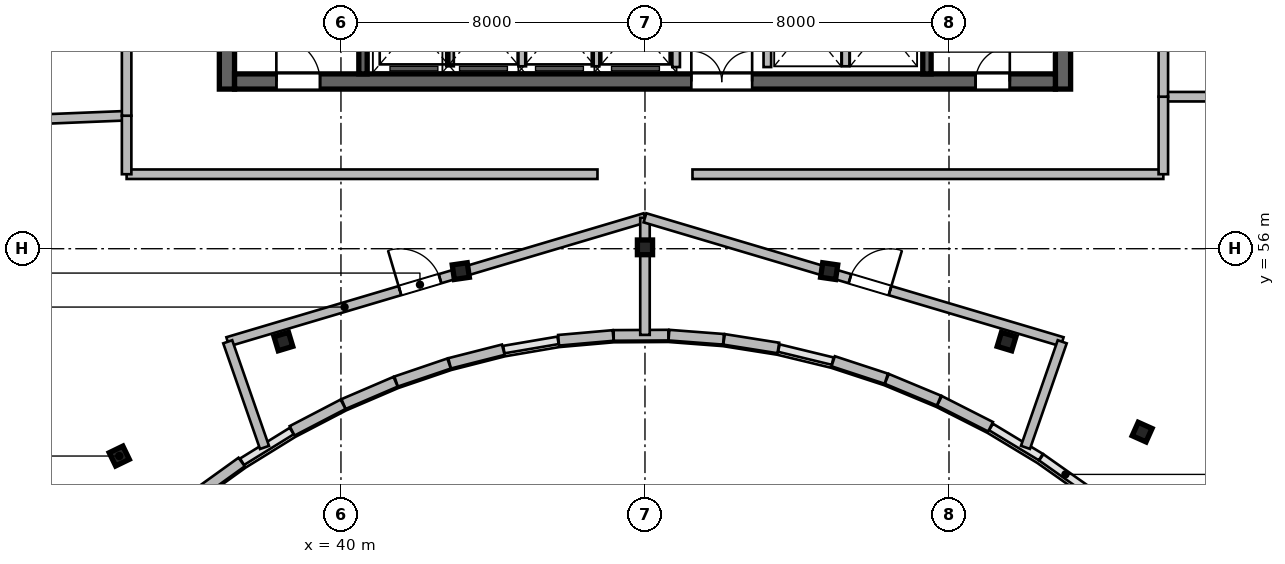
"""IFC4 building model, lengths in metres.
Left out: names, types, materials, properties, quantities, classifications, styles, units other than length and angle.
Written with IfcOpenShell. Run it as: python <this file> out.ifc"""

import sys

from ifc_helpers import new_model, si_unit, direction, frame, frame_2d, origin, origin_2d, place, context, subcontext, project, spatial, rectangle, i_section, extrude, source, transform, mapped, element, fill, save


model = new_model("IFC4")
c1 = context("Model", 3, precision=1e-05, world=origin(), true_north=direction((0.0, 1.0)))
c2 = subcontext(c1, "Body", "Model", "MODEL_VIEW")
j1 = project(units=[si_unit("LENGTHUNIT", "METRE"), si_unit("PLANEANGLEUNIT", "RADIAN")], contexts=[c1])
p1 = place(None, origin())
s1 = spatial("IfcSite", under=j1, at=p1, CompositionType="ELEMENT")
p2 = place(p1, origin())
s2 = spatial("IfcBuilding", under=s1, at=p2, CompositionType="ELEMENT")
p3 = place(p2, frame((0.0, 0.0, 299.1)))
s3 = spatial("IfcBuildingStorey", under=s2, at=p3, CompositionType="ELEMENT", Elevation=299.1)
m1 = source(origin(), c2, "Body", "SweptSolid", [
    extrude(rectangle(XDim=12.0, YDim=0.4, at=frame_2d((6.0, 0.0))), origin(), (0.0, 0.0, 1.0), 3.9),
])
for number, where, z_axis, x_axis in (
    (1, (37.0, 60.2, 0.0), (0.0, 0.0, 1.0), (0.0, 1.0, 0.0)),
    (2, (59.0, 60.2, 0.0), (0.0, 0.0, 1.0), (0.0, 1.0, 0.0)),
):
    element("IfcWall", number, at=place(p3, frame(where, z_axis=z_axis, x_axis=x_axis)), inside=s3, PredefinedType="SHEAR", context=c2, shape_type="MappedRepresentation", body=[
        mapped(m1, transform((0.0, 0.0, 0.0), scale=1.0)),
    ])
m2 = source(origin(), c2, "Body", "SweptSolid", [
    extrude(rectangle(XDim=21.6, YDim=0.4, at=frame_2d((10.8, 0.0))), origin(), (0.0, 0.0, 1.0), 3.9),
])
p4 = place(p3, frame((37.2, 60.4, 0.0), z_axis=(0.0, 0.0, 1.0), x_axis=(1.0, 0.0, 0.0)))
e3 = element("IfcWall", 3, at=p4, inside=s3, PredefinedType="SHEAR", context=c2, shape_type="MappedRepresentation", body=[
    mapped(m2, transform((0.0, 0.0, 0.0), scale=1.0)),
])
p5 = place(p4, frame((1.1, 0.0, 0.0)))
e4 = element("IfcOpeningElement", 4, at=p5, cuts=e3, PredefinedType="OPENING", context=c2, shape_type="SweptSolid", body=[
    extrude(rectangle(XDim=1.15, YDim=2.15, at=frame_2d((0.575, 1.075))), frame((0.0, 0.21, 0.0), z_axis=(0.0, -1.0, 0.0), x_axis=(1.0, 0.0, 0.0)), (0.0, 0.0, 1.0), 0.42),
])
p6 = place(p4, frame((19.5, 0.0, 0.0)))
e5 = element("IfcOpeningElement", 5, at=p6, cuts=e3, PredefinedType="OPENING", context=c2, shape_type="SweptSolid", body=[
    extrude(rectangle(XDim=0.9, YDim=2.1, at=frame_2d((0.45, 1.05))), frame((0.0, 0.21, 0.0), z_axis=(0.0, -1.0, 0.0), x_axis=(1.0, 0.0, 0.0)), (0.0, 0.0, 1.0), 0.42),
])
p7 = place(p4, frame((12.02, 0.0, 0.0)))
e6 = element("IfcOpeningElement", 6, at=p7, cuts=e3, PredefinedType="OPENING", context=c2, shape_type="SweptSolid", body=[
    extrude(rectangle(XDim=1.6, YDim=2.15, at=frame_2d((0.8, 1.075))), frame((0.0, 0.21, 0.0), z_axis=(0.0, -1.0, 0.0), x_axis=(1.0, 0.0, 0.0)), (0.0, 0.0, 1.0), 0.42),
])
m3 = source(origin(), c2, "Body", "SweptSolid", [
    extrude(rectangle(XDim=11.2, YDim=0.22, at=frame_2d((5.6, 0.0))), origin(), (0.0, 0.0, 1.0), 3.9),
])
p8 = place(p3, frame((40.58, 60.6, 0.0), z_axis=(0.0, 0.0, 1.0), x_axis=(0.0, 1.0, 0.0)))
e7 = element("IfcWall", 7, at=p8, inside=s3, PredefinedType="SHEAR", context=c2, shape_type="MappedRepresentation", body=[
    mapped(m3, transform((0.0, 0.0, 0.0), scale=1.0)),
])
p9 = place(p3, frame((55.42, 60.6, 0.0), z_axis=(0.0, 0.0, 1.0), x_axis=(0.0, 1.0, 0.0)))
e8 = element("IfcWall", 8, at=p9, inside=s3, PredefinedType="SHEAR", context=c2, shape_type="MappedRepresentation", body=[
    mapped(m3, transform((0.0, 0.0, 0.0), scale=1.0)),
])
p10 = place(p9, frame((9.645, 0.0, 0.0)))
e9 = element("IfcOpeningElement", 9, at=p10, cuts=e8, PredefinedType="OPENING", context=c2, shape_type="SweptSolid", body=[
    extrude(rectangle(XDim=1.15, YDim=2.15, at=frame_2d((0.575, 1.075))), frame((0.0, 0.12, 0.0), z_axis=(0.0, -1.0, 0.0), x_axis=(1.0, 0.0, 0.0)), (0.0, 0.0, 1.0), 0.24),
])
m4 = source(origin(), c2, "Body", "SweptSolid", [
    extrude(i_section(OverallWidth=0.399, OverallDepth=0.387, WebThickness=0.021, FlangeThickness=0.033, at=origin_2d()), origin(), (0.0, 0.0, 1.0), 3.9),
])
for number, where, z_axis, x_axis in (
    (10, (34.166, 50.545, 0.0), (0.0, 0.0, 1.0), (-0.436, 0.9, 0.0)),
    (11, (38.485, 53.558, 0.0), (0.0, 0.0, 1.0), (-0.289, 0.957, 0.0)),
    (12, (43.154, 55.411, 0.0), (0.0, 0.0, 1.0), (-0.143, 0.99, 0.0)),
    (13, (48.0, 56.036, 0.0), (0.0, 0.0, 1.0), (0.0, 1.0, 0.0)),
    (14, (52.846, 55.411, 0.0), (0.0, 0.0, 1.0), (0.143, 0.99, 0.0)),
    (15, (57.515, 53.558, 0.0), (0.0, 0.0, 1.0), (0.289, 0.957, 0.0)),
    (16, (61.082, 51.175, 0.0), (0.0, 0.0, 1.0), (0.409, 0.912, 0.0)),
):
    element("IfcColumn", number, at=place(p3, frame(where, z_axis=z_axis, x_axis=x_axis)), inside=s3, PredefinedType="COLUMN", context=c2, shape_type="MappedRepresentation", body=[
        mapped(m4, transform((0.0, 0.0, 0.0), scale=1.0)),
    ])
m5 = source(origin(), c2, "Body", "SweptSolid", [
    extrude(rectangle(XDim=1.509, YDim=0.28, at=frame_2d((0.754, 0.0))), origin(), (0.0, 0.0, 1.0), 3.64),
])
p11 = place(p3, frame((57.094, 51.315, 0.0), z_axis=(0.0, 0.0, 1.0), x_axis=(-0.89169189228, 0.452642871635, 0.0)))
e17 = element("IfcWall", 17, at=p11, inside=s3, PredefinedType="SOLIDWALL", context=c2, shape_type="MappedRepresentation", body=[
    mapped(m5, transform((0.0, 0.0, 0.0), scale=1.0)),
])
m6 = source(origin(), c2, "Body", "SweptSolid", [
    extrude(rectangle(XDim=1.488, YDim=0.28, at=frame_2d((0.744, 0.0))), origin(), (0.0, 0.0, 1.0), 3.64),
])
p12 = place(p3, frame((55.736, 52.004, 0.0), z_axis=(0.0, 0.0, 1.0), x_axis=(-0.923261314935, 0.384172545017, 0.0)))
e18 = element("IfcWall", 18, at=p12, inside=s3, PredefinedType="SOLIDWALL", context=c2, shape_type="MappedRepresentation", body=[
    mapped(m6, transform((0.0, 0.0, 0.0), scale=1.0)),
])
m7 = source(origin(), c2, "Body", "SweptSolid", [
    extrude(rectangle(XDim=1.47, YDim=0.28, at=frame_2d((0.735, 0.0))), origin(), (0.0, 0.0, 1.0), 3.64),
])
p13 = place(p3, frame((54.35, 52.58, 0.0), z_axis=(0.0, 0.0, 1.0), x_axis=(-0.950248878954, 0.311491682145, 0.0)))
e19 = element("IfcWall", 19, at=p13, inside=s3, PredefinedType="SOLIDWALL", context=c2, shape_type="MappedRepresentation", body=[
    mapped(m7, transform((0.0, 0.0, 0.0), scale=1.0)),
])
m8 = source(origin(), c2, "Body", "SweptSolid", [
    extrude(rectangle(XDim=1.446, YDim=0.28, at=frame_2d((0.723, 0.0))), origin(), (0.0, 0.0, 1.0), 3.64),
])
p14 = place(p3, frame((51.509, 53.388, 0.0), z_axis=(0.0, 0.0, 1.0), x_axis=(-0.987650460941, 0.156673440642, 0.0)))
e20 = element("IfcWall", 20, at=p14, inside=s3, PredefinedType="SOLIDWALL", context=c2, shape_type="MappedRepresentation", body=[
    mapped(m8, transform((0.0, 0.0, 0.0), scale=1.0)),
])
m9 = source(origin(), c2, "Body", "SweptSolid", [
    extrude(rectangle(XDim=1.44, YDim=0.28, at=frame_2d((0.72, 0.0))), origin(), (0.0, 0.0, 1.0), 3.64),
])
p15 = place(p3, frame((50.066, 53.616, 0.0), z_axis=(0.0, 0.0, 1.0), x_axis=(-0.997124860794, 0.075776064736, 0.0)))
e21 = element("IfcWall", 21, at=p15, inside=s3, PredefinedType="SOLIDWALL", context=c2, shape_type="MappedRepresentation", body=[
    mapped(m9, transform((0.0, 0.0, 0.0), scale=1.0)),
])
m10 = source(origin(), c2, "Body", "SweptSolid", [
    extrude(rectangle(XDim=1.438, YDim=0.28, at=frame_2d((0.719, 0.0))), origin(), (0.0, 0.0, 1.0), 3.64),
])
p16 = place(p3, frame((48.615, 53.726, 0.0), z_axis=(0.0, 0.0, 1.0), x_axis=(-0.999982357135, -0.005940153174, 0.0)))
e22 = element("IfcWall", 22, at=p16, inside=s3, PredefinedType="SOLIDWALL", context=c2, shape_type="MappedRepresentation", body=[
    mapped(m10, transform((0.0, 0.0, 0.0), scale=1.0)),
])
m11 = source(origin(), c2, "Body", "SweptSolid", [
    extrude(rectangle(XDim=1.441, YDim=0.28, at=frame_2d((0.72, 0.0))), origin(), (0.0, 0.0, 1.0), 3.64),
])
p17 = place(p3, frame((47.162, 53.717, 0.0), z_axis=(0.0, 0.0, 1.0), x_axis=(-0.99617032352, -0.087433898101, 0.0)))
e23 = element("IfcWall", 23, at=p17, inside=s3, PredefinedType="SOLIDWALL", context=c2, shape_type="MappedRepresentation", body=[
    mapped(m11, transform((0.0, 0.0, 0.0), scale=1.0)),
])
m12 = source(origin(), c2, "Body", "SweptSolid", [
    extrude(rectangle(XDim=1.458, YDim=0.28, at=frame_2d((0.729, 0.0))), origin(), (0.0, 0.0, 1.0), 3.64),
])
p18 = place(p3, frame((44.271, 53.343, 0.0), z_axis=(0.0, 0.0, 1.0), x_axis=(-0.969109544438, -0.246630677083, 0.0)))
e24 = element("IfcWall", 24, at=p18, inside=s3, PredefinedType="SOLIDWALL", context=c2, shape_type="MappedRepresentation", body=[
    mapped(m12, transform((0.0, 0.0, 0.0), scale=1.0)),
])
m13 = source(origin(), c2, "Body", "SweptSolid", [
    extrude(rectangle(XDim=1.473, YDim=0.28, at=frame_2d((0.736, 0.0))), origin(), (0.0, 0.0, 1.0), 3.64),
])
p19 = place(p3, frame((42.845, 52.979, 0.0), z_axis=(0.0, 0.0, 1.0), x_axis=(-0.946641296917, -0.322289086026, 0.0)))
e25 = element("IfcWall", 25, at=p19, inside=s3, PredefinedType="SOLIDWALL", context=c2, shape_type="MappedRepresentation", body=[
    mapped(m13, transform((0.0, 0.0, 0.0), scale=1.0)),
])
m14 = source(origin(), c2, "Body", "SweptSolid", [
    extrude(rectangle(XDim=1.49, YDim=0.28, at=frame_2d((0.745, 0.0))), origin(), (0.0, 0.0, 1.0), 3.64),
])
p20 = place(p3, frame((41.438, 52.5, 0.0), z_axis=(0.0, 0.0, 1.0), x_axis=(-0.919009427656, -0.394235553799, 0.0)))
e26 = element("IfcWall", 26, at=p20, inside=s3, PredefinedType="SOLIDWALL", context=c2, shape_type="MappedRepresentation", body=[
    mapped(m14, transform((0.0, 0.0, 0.0), scale=1.0)),
])
m15 = source(origin(), c2, "Body", "SweptSolid", [
    extrude(rectangle(XDim=1.512, YDim=0.28, at=frame_2d((0.756, 0.0))), origin(), (0.0, 0.0, 1.0), 3.64),
])
p21 = place(p3, frame((40.056, 51.906, 0.0), z_axis=(0.0, 0.0, 1.0), x_axis=(-0.886841011195, -0.462074691865, 0.0)))
e27 = element("IfcWall", 27, at=p21, inside=s3, PredefinedType="SOLIDWALL", context=c2, shape_type="MappedRepresentation", body=[
    mapped(m15, transform((0.0, 0.0, 0.0), scale=1.0)),
])
m16 = source(origin(), c2, "Body", "SweptSolid", [
    extrude(rectangle(XDim=1.561, YDim=0.28, at=frame_2d((0.781, 0.0))), origin(), (0.0, 0.0, 1.0), 3.64),
])
p22 = place(p3, frame((37.387, 50.387, 0.0), z_axis=(0.0, 0.0, 1.0), x_axis=(-0.81154027425, -0.584296485758, 0.0)))
e28 = element("IfcWall", 28, at=p22, inside=s3, PredefinedType="SOLIDWALL", context=c2, shape_type="MappedRepresentation", body=[
    mapped(m16, transform((0.0, 0.0, 0.0), scale=1.0)),
])
m17 = source(origin(), c2, "Body", "SweptSolid", [
    extrude(rectangle(XDim=2.24, YDim=0.2, at=frame_2d((1.12, 0.0))), origin(), (0.0, 0.0, 1.0), 3.64),
])
for number, where, z_axis, x_axis in (
    (29, (48.82, 60.78, 0.0), (0.0, 0.0, 1.0), (0.0, 1.0, 0.0)),
    (30, (51.22, 60.78, 0.0), (0.0, 0.0, 1.0), (0.0, 1.0, 0.0)),
):
    element("IfcWall", number, at=place(p3, frame(where, z_axis=z_axis, x_axis=x_axis)), inside=s3, PredefinedType="SOLIDWALL", context=c2, shape_type="MappedRepresentation", body=[
        mapped(m17, transform((0.0, 0.0, 0.0), scale=1.0)),
    ])
m18 = source(origin(), c2, "Body", "SweptSolid", [
    extrude(rectangle(XDim=2.2, YDim=0.2, at=frame_2d((1.1, 0.0))), origin(), (0.0, 0.0, 1.0), 3.64),
])
for number, where, z_axis, x_axis in (
    (31, (42.87, 60.8, 0.0), (0.0, 0.0, 1.0), (0.0, 1.0, 0.0)),
    (32, (44.77, 60.8, 0.0), (0.0, 0.0, 1.0), (0.0, 1.0, 0.0)),
    (33, (46.7, 60.8, 0.0), (0.0, 0.0, 1.0), (0.0, 1.0, 0.0)),
    (34, (53.28, 60.8, 0.0), (0.0, 0.0, 1.0), (0.0, 1.0, 0.0)),
):
    element("IfcWall", number, at=place(p3, frame(where, z_axis=z_axis, x_axis=x_axis)), inside=s3, PredefinedType="SOLIDWALL", context=c2, shape_type="MappedRepresentation", body=[
        mapped(m18, transform((0.0, 0.0, 0.0), scale=1.0)),
    ])
m19 = source(origin(), c2, "Body", "SweptSolid", [
    extrude(rectangle(XDim=11.454, YDim=0.25, at=frame_2d((5.727, 0.0))), origin(), (0.0, 0.0, 1.0), 3.314),
])
p23 = place(p3, frame((37.021, 53.552, 0.0), z_axis=(0.0, 0.0, 1.0), x_axis=(0.958594874645, 0.284773359541, 0.0)))
e35 = element("IfcWall", 35, at=p23, inside=s3, PredefinedType="PARTITIONING", context=c2, shape_type="MappedRepresentation", body=[
    mapped(m19, transform((0.0, 0.0, 0.0), scale=1.0)),
])
p24 = place(p23, frame((4.727, 0.0, 0.0)))
e36 = element("IfcOpeningElement", 36, at=p24, cuts=e35, PredefinedType="OPENING", context=c2, shape_type="SweptSolid", body=[
    extrude(rectangle(XDim=1.1, YDim=2.15, at=frame_2d((0.55, 1.075))), frame((0.0, 0.135, 0.0), z_axis=(0.0, -1.0, 0.0), x_axis=(1.0, 0.0, 0.0)), (0.0, 0.0, 1.0), 0.27),
])
m20 = source(origin(), c2, "Body", "SweptSolid", [
    extrude(rectangle(XDim=2.944, YDim=0.25, at=frame_2d((1.472, 0.0))), origin(), (0.0, 0.0, 1.0), 3.64),
])
p25 = place(p3, frame((37.988, 50.771, 0.0), z_axis=(0.0, 0.0, 1.0), x_axis=(-0.328565655286, 0.944481132774, 0.0)))
e37 = element("IfcWall", 37, at=p25, inside=s3, PredefinedType="PARTITIONING", context=c2, shape_type="MappedRepresentation", body=[
    mapped(m20, transform((0.0, 0.0, 0.0), scale=1.0)),
])
m21 = source(origin(), c2, "Body", "SweptSolid", [
    extrude(rectangle(XDim=3.081, YDim=0.25, at=frame_2d((1.54, 0.0))), origin(), (0.0, 0.0, 1.0), 3.314),
])
p26 = place(p3, frame((48.0, 53.733, 0.0), z_axis=(0.0, 0.0, 1.0), x_axis=(0.0, 1.0, 0.0)))
e38 = element("IfcWall", 38, at=p26, inside=s3, PredefinedType="PARTITIONING", context=c2, shape_type="MappedRepresentation", body=[
    mapped(m21, transform((0.0, 0.0, 0.0), scale=1.0)),
])
p27 = place(p3, frame((48.0, 56.813, 0.0), z_axis=(0.0, 0.0, 1.0), x_axis=(0.958594874645, -0.284773359541, 0.0)))
e39 = element("IfcWall", 39, at=p27, inside=s3, PredefinedType="PARTITIONING", context=c2, shape_type="MappedRepresentation", body=[
    mapped(m19, transform((0.0, 0.0, 0.0), scale=1.0)),
])
p28 = place(p27, frame((5.627, 0.0, 0.0)))
e40 = element("IfcOpeningElement", 40, at=p28, cuts=e39, PredefinedType="OPENING", context=c2, shape_type="SweptSolid", body=[
    extrude(rectangle(XDim=1.1, YDim=2.15, at=frame_2d((0.55, 1.075))), frame((0.0, 0.135, 0.0), z_axis=(0.0, -1.0, 0.0), x_axis=(1.0, 0.0, 0.0)), (0.0, 0.0, 1.0), 0.27),
])
m22 = source(origin(), c2, "Body", "SweptSolid", [
    extrude(rectangle(XDim=2.942, YDim=0.25, at=frame_2d((1.471, 0.0))), origin(), (0.0, 0.0, 1.0), 3.64),
])
p29 = place(p3, frame((58.013, 50.773, 0.0), z_axis=(0.0, 0.0, 1.0), x_axis=(0.328623620494, 0.944460965871, 0.0)))
e41 = element("IfcWall", 41, at=p29, inside=s3, PredefinedType="PARTITIONING", context=c2, shape_type="MappedRepresentation", body=[
    mapped(m22, transform((0.0, 0.0, 0.0), scale=1.0)),
])
m23 = source(origin(), c2, "Body", "SweptSolid", [
    extrude(rectangle(XDim=12.39, YDim=0.25, at=frame_2d((6.195, 0.0))), origin(), (0.0, 0.0, 1.0), 3.64),
])
for number, where, z_axis, x_axis in (
    (42, (34.36, 57.96, 0.0), (0.0, 0.0, 1.0), (1.0, 0.0, 0.0)),
    (43, (49.25, 57.96, 0.0), (0.0, 0.0, 1.0), (1.0, 0.0, 0.0)),
):
    element("IfcWall", number, at=place(p3, frame(where, z_axis=z_axis, x_axis=x_axis)), inside=s3, PredefinedType="PARTITIONING", context=c2, shape_type="MappedRepresentation", body=[
        mapped(m23, transform((0.0, 0.0, 0.0), scale=1.0)),
    ])
m24 = source(origin(), c2, "Body", "SweptSolid", [
    extrude(rectangle(XDim=13.499, YDim=0.25, at=frame_2d((6.75, 0.0))), origin(), (0.0, 0.0, 1.0), 3.64),
])
p30 = place(p3, frame((20.872, 58.951, 0.0), z_axis=(0.0, 0.0, 1.0), x_axis=(0.999172424054, 0.04067513995, 0.0)))
e44 = element("IfcWall", 44, at=p30, inside=s3, PredefinedType="PARTITIONING", context=c2, shape_type="MappedRepresentation", body=[
    mapped(m24, transform((0.0, 0.0, 0.0), scale=1.0)),
])
m25 = source(origin(), c2, "Body", "SweptSolid", [
    extrude(rectangle(XDim=1.54, YDim=0.25, at=frame_2d((0.77, 0.0))), origin(), (0.0, 0.0, 1.0), 3.64),
])
p31 = place(p3, frame((34.36, 57.96, 0.0), z_axis=(0.0, 0.0, 1.0), x_axis=(0.0, 1.0, 0.0)))
e45 = element("IfcWall", 45, at=p31, inside=s3, PredefinedType="PARTITIONING", context=c2, shape_type="MappedRepresentation", body=[
    mapped(m25, transform((0.0, 0.0, 0.0), scale=1.0)),
])
m26 = source(origin(), c2, "Body", "SweptSolid", [
    extrude(rectangle(XDim=6.0, YDim=0.25, at=frame_2d((3.0, 0.0))), origin(), (0.0, 0.0, 1.0), 3.64),
])
p32 = place(p3, frame((34.36, 59.5, 0.0), z_axis=(0.0, 0.0, 1.0), x_axis=(0.0, 1.0, 0.0)))
e46 = element("IfcWall", 46, at=p32, inside=s3, PredefinedType="PARTITIONING", context=c2, shape_type="MappedRepresentation", body=[
    mapped(m26, transform((0.0, 0.0, 0.0), scale=1.0)),
])
p33 = place(p32, frame((2.45, 0.0, 0.0)))
e47 = element("IfcOpeningElement", 47, at=p33, cuts=e46, PredefinedType="OPENING", context=c2, shape_type="SweptSolid", body=[
    extrude(rectangle(XDim=1.1, YDim=2.15, at=frame_2d((0.55, 1.075))), frame((0.0, 0.135, 0.0), z_axis=(0.0, -1.0, 0.0), x_axis=(1.0, 0.0, 0.0)), (0.0, 0.0, 1.0), 0.27),
])
m27 = source(origin(), c2, "Body", "SweptSolid", [
    extrude(rectangle(XDim=11.633, YDim=0.25, at=frame_2d((5.816, 0.0))), origin(), (0.0, 0.0, 1.0), 3.64),
])
p34 = place(p3, frame((61.64, 60.0, 0.0), z_axis=(0.0, 0.0, 1.0), x_axis=(1.0, 0.0, 0.0)))
e48 = element("IfcWall", 48, at=p34, inside=s3, PredefinedType="PARTITIONING", context=c2, shape_type="MappedRepresentation", body=[
    mapped(m27, transform((0.0, 0.0, 0.0), scale=1.0)),
])
m28 = source(origin(), c2, "Body", "SweptSolid", [
    extrude(rectangle(XDim=2.04, YDim=0.25, at=frame_2d((1.02, 0.0))), origin(), (0.0, 0.0, 1.0), 3.64),
])
p35 = place(p3, frame((61.64, 57.96, 0.0), z_axis=(0.0, 0.0, 1.0), x_axis=(0.0, 1.0, 0.0)))
e49 = element("IfcWall", 49, at=p35, inside=s3, PredefinedType="PARTITIONING", context=c2, shape_type="MappedRepresentation", body=[
    mapped(m28, transform((0.0, 0.0, 0.0), scale=1.0)),
])
m29 = source(origin(), c2, "Body", "SweptSolid", [
    extrude(rectangle(XDim=5.5, YDim=0.25, at=frame_2d((2.75, 0.0))), origin(), (0.0, 0.0, 1.0), 3.64),
])
p36 = place(p3, frame((61.64, 60.0, 0.0), z_axis=(0.0, 0.0, 1.0), x_axis=(0.0, 1.0, 0.0)))
e50 = element("IfcWall", 50, at=p36, inside=s3, PredefinedType="PARTITIONING", context=c2, shape_type="MappedRepresentation", body=[
    mapped(m29, transform((0.0, 0.0, 0.0), scale=1.0)),
])
p37 = place(p36, frame((1.615, 0.0, 0.0)))
e51 = element("IfcOpeningElement", 51, at=p37, cuts=e50, PredefinedType="OPENING", context=c2, shape_type="SweptSolid", body=[
    extrude(rectangle(XDim=0.95, YDim=2.1, at=frame_2d((0.475, 1.05))), frame((0.0, 0.135, 0.0), z_axis=(0.0, -1.0, 0.0), x_axis=(1.0, 0.0, 0.0)), (0.0, 0.0, 1.0), 0.27),
])
m30 = source(origin(), c2, "Body", "SweptSolid", [
    extrude(rectangle(XDim=1.15, YDim=2.15, at=frame_2d((0.575, 1.075))), frame((0.0, 0.025, 0.0), z_axis=(0.0, -1.0, 0.0), x_axis=(1.0, 0.0, 0.0)), (0.0, 0.0, 1.0), 0.05),
])
p38 = place(p5, origin())
e52 = element("IfcDoor", 52, at=p38, inside=s3, OperationType="SINGLE_SWING_LEFT", PredefinedType="DOOR", context=c2, shape_type="MappedRepresentation", body=[
    mapped(m30, transform((0.0, 0.0, 0.0), scale=1.0)),
])
fill(e4, e52)
m31 = source(origin(), c2, "Body", "SweptSolid", [
    extrude(rectangle(XDim=0.9, YDim=2.1, at=frame_2d((0.45, 1.05))), frame((0.0, 0.025, 0.0), z_axis=(0.0, -1.0, 0.0), x_axis=(1.0, 0.0, 0.0)), (0.0, 0.0, 1.0), 0.05),
])
p39 = place(p6, origin())
e53 = element("IfcDoor", 53, at=p39, inside=s3, OperationType="SINGLE_SWING_RIGHT", PredefinedType="DOOR", context=c2, shape_type="MappedRepresentation", body=[
    mapped(m31, transform((0.0, 0.0, 0.0), scale=1.0)),
])
fill(e5, e53)
m32 = source(origin(), c2, "Body", "SweptSolid", [
    extrude(rectangle(XDim=1.6, YDim=2.15, at=frame_2d((0.8, 1.075))), frame((0.0, 0.025, 0.0), z_axis=(0.0, -1.0, 0.0), x_axis=(1.0, 0.0, 0.0)), (0.0, 0.0, 1.0), 0.05),
])
p40 = place(p7, origin())
e54 = element("IfcDoor", 54, at=p40, inside=s3, OperationType="DOUBLE_DOOR_SINGLE_SWING", PredefinedType="DOOR", context=c2, shape_type="MappedRepresentation", body=[
    mapped(m32, transform((0.0, 0.0, 0.0), scale=1.0)),
])
fill(e6, e54)
m33 = source(origin(), c2, "Body", "SweptSolid", [
    extrude(rectangle(XDim=1.1, YDim=2.15, at=frame_2d((0.55, 1.075))), frame((0.0, 0.025, 0.0), z_axis=(0.0, -1.0, 0.0), x_axis=(1.0, 0.0, 0.0)), (0.0, 0.0, 1.0), 0.05),
])
p41 = place(p24, origin())
e55 = element("IfcDoor", 55, at=p41, inside=s3, OperationType="SINGLE_SWING_LEFT", PredefinedType="DOOR", context=c2, shape_type="MappedRepresentation", body=[
    mapped(m33, transform((0.0, 0.0, 0.0), scale=1.0)),
])
fill(e36, e55)
p42 = place(p28, origin())
e56 = element("IfcDoor", 56, at=p42, inside=s3, OperationType="SINGLE_SWING_RIGHT", PredefinedType="DOOR", context=c2, shape_type="MappedRepresentation", body=[
    mapped(m33, transform((0.0, 0.0, 0.0), scale=1.0)),
])
fill(e40, e56)
save(model, sys.argv[1])
